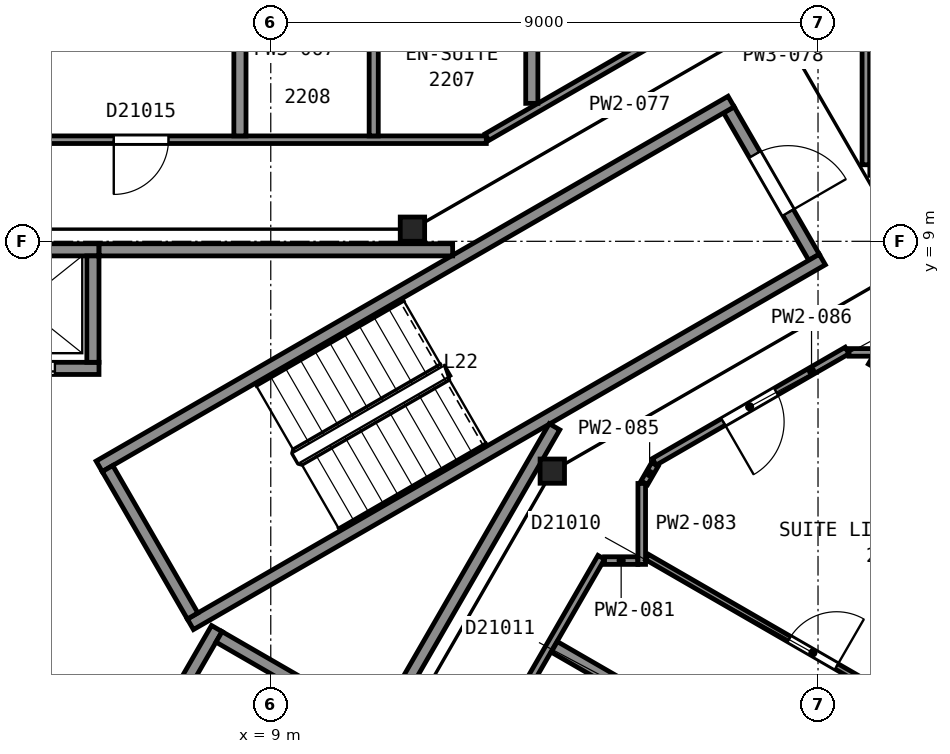
"""IFC4 building model, lengths in metres.
Left out: names, types, materials, properties, quantities, classifications, styles, units other than length and angle.
Written with IfcOpenShell. Run it as: python <this file> out.ifc"""

import sys

from ifc_helpers import new_model, si_unit, direction, frame, frame_2d, origin, origin_2d, place, context, subcontext, project, spatial, rectangle, i_section, extrude, element, fill, save


model = new_model("IFC4")
c1 = context("Model", 3, precision=1e-05, world=origin(), true_north=direction((0.0, 1.0)))
c2 = subcontext(c1, "Body", "Model", "MODEL_VIEW")
j1 = project(units=[si_unit("LENGTHUNIT", "METRE"), si_unit("PLANEANGLEUNIT", "RADIAN")], contexts=[c1])
p1 = place(None, origin())
s1 = spatial("IfcSite", under=j1, at=p1, CompositionType="ELEMENT")
p2 = place(p1, origin())
s2 = spatial("IfcBuilding", under=s1, at=p2, CompositionType="ELEMENT")
p3 = place(p2, frame((0.0, 0.0, 96.4)))
s3 = spatial("IfcBuildingStorey", under=s2, at=p3, CompositionType="ELEMENT", Elevation=96.4)
for number, where, z_axis, x_axis in (
    (1, (13.63, 5.22, 0.0), (0.0, 0.0, 1.0), (1.0, 0.0, 0.0)),
    (2, (11.33, 9.2, 0.0), (0.0, 0.0, 1.0), (1.0, 0.0, 0.0)),
):
    element("IfcColumn", number, at=place(p3, frame(where, z_axis=z_axis, x_axis=x_axis)), inside=s3, PredefinedType="COLUMN", context=c2, shape_type="SweptSolid", body=[
        extrude(i_section(OverallWidth=0.401, OverallDepth=0.399, WebThickness=0.025, FlangeThickness=0.04, FilletRadius=0.015, at=origin_2d()), origin(), (0.0, 0.0, 1.0), 3.6),
    ])
p4 = place(p3, frame((17.934, 8.738, 0.0), z_axis=(0.0, 0.0, 1.0), x_axis=(-0.49998411664, 0.866034573852, 0.0)))
e3 = element("IfcWall", 3, at=p4, inside=s3, PredefinedType="PARTITIONING", context=c2, shape_type="SweptSolid", body=[
    extrude(rectangle(XDim=2.8, YDim=0.2, at=frame_2d((1.4, 0.0))), origin(), (0.0, 0.0, 1.0), 3.35),
])
p5 = place(p4, frame((0.85, 0.0, 0.0)))
e4 = element("IfcOpeningElement", 4, at=p5, cuts=e3, PredefinedType="OPENING", context=c2, shape_type="SweptSolid", body=[
    extrude(rectangle(XDim=1.1, YDim=2.1, at=frame_2d((0.55, 1.05))), frame((0.0, 0.11, 0.0), z_axis=(0.0, -1.0, 0.0), x_axis=(1.0, 0.0, 0.0)), (0.0, 0.0, 1.0), 0.22),
])
for number, where, z_axis, x_axis in (
    (5, (6.178, 5.299, 0.0), (0.0, 0.0, 1.0), (0.866, 0.5, 0.0)),
    (6, (7.678, 2.701, 0.0), (0.0, 0.0, 1.0), (0.866, 0.5, 0.0)),
):
    element("IfcWall", number, at=place(p3, frame(where, z_axis=z_axis, x_axis=x_axis)), inside=s3, PredefinedType="PARTITIONING", context=c2, shape_type="SweptSolid", body=[
        extrude(rectangle(XDim=12.0, YDim=0.2, at=frame_2d((6.0, 0.0))), origin(), (0.0, 0.0, 1.0), 3.35),
    ])
p6 = place(p3, frame((7.715, 2.838, 0.0), z_axis=(0.0, 0.0, 1.0), x_axis=(-0.500049511043, 0.865996816683, 0.0)))
e7 = element("IfcWall", 7, at=p6, inside=s3, PredefinedType="PARTITIONING", context=c2, shape_type="SweptSolid", body=[
    extrude(rectangle(XDim=2.8, YDim=0.2, at=frame_2d((1.4, 0.0))), origin(), (0.0, 0.0, 1.0), 3.35),
])
p7 = place(p3, frame((3.625, 6.91, 0.0), z_axis=(0.0, 0.0, 1.0), x_axis=(1.0, 0.0, 0.0)))
e8 = element("IfcWall", 8, at=p7, inside=s3, PredefinedType="PARTITIONING", context=c2, shape_type="SweptSolid", body=[
    extrude(rectangle(XDim=2.55, YDim=0.2, at=frame_2d((1.275, 0.0))), origin(), (0.0, 0.0, 1.0), 3.6),
])
p8 = place(p7, frame((0.725, 0.0, 0.0)))
e9 = element("IfcOpeningElement", 9, at=p8, cuts=e8, PredefinedType="OPENING", context=c2, shape_type="SweptSolid", body=[
    extrude(rectangle(XDim=1.1, YDim=2.1, at=frame_2d((0.55, 1.05))), frame((0.0, 0.11, 0.0), z_axis=(0.0, -1.0, 0.0), x_axis=(1.0, 0.0, 0.0)), (0.0, 0.0, 1.0), 0.22),
])
p9 = place(p3, frame((3.625, 8.86, 0.0), z_axis=(0.0, 0.0, 1.0), x_axis=(1.0, 0.0, 0.0)))
e10 = element("IfcWall", 10, at=p9, inside=s3, PredefinedType="PARTITIONING", context=c2, shape_type="SweptSolid", body=[
    extrude(rectangle(XDim=2.55, YDim=0.2, at=frame_2d((1.275, 0.0))), origin(), (0.0, 0.0, 1.0), 3.6),
])
p10 = place(p3, frame((5.663, -1.612, 0.0), z_axis=(0.0, 0.0, 1.0), x_axis=(0.49998122708, 0.866036242063, 0.0)))
e11 = element("IfcWall", 11, at=p10, inside=s3, PredefinedType="PARTITIONING", context=c2, shape_type="SweptSolid", body=[
    extrude(rectangle(XDim=4.9, YDim=0.2, at=frame_2d((2.45, 0.0))), origin(), (0.0, 0.0, 1.0), 3.6),
])
p11 = place(p3, frame((6.075, 7.01, 0.0), z_axis=(0.0, 0.0, 1.0), x_axis=(0.0, 1.0, 0.0)))
e12 = element("IfcWall", 12, at=p11, inside=s3, PredefinedType="PARTITIONING", context=c2, shape_type="SweptSolid", body=[
    extrude(rectangle(XDim=1.75, YDim=0.2, at=frame_2d((0.875, 0.0))), origin(), (0.0, 0.0, 1.0), 3.6),
])
p12 = place(p3, frame((9.665, 1.62, 0.0), z_axis=(0.0, 0.0, 1.0), x_axis=(-0.866002029911, 0.500040482552, 0.0)))
e13 = element("IfcWall", 13, at=p12, inside=s3, PredefinedType="PARTITIONING", context=c2, shape_type="SweptSolid", body=[
    extrude(rectangle(XDim=1.75, YDim=0.2, at=frame_2d((0.875, 0.0))), origin(), (0.0, 0.0, 1.0), 3.6),
])
p13 = place(p3, frame((6.177, 8.86, 0.0), z_axis=(0.0, 0.0, 1.0), x_axis=(1.0, 0.0, 0.0)))
e14 = element("IfcWall", 14, at=p13, inside=s3, PredefinedType="PARTITIONING", context=c2, shape_type="SweptSolid", body=[
    extrude(rectangle(XDim=5.814, YDim=0.2, at=frame_2d((2.907, 0.0))), origin(), (0.0, 0.0, 1.0), 3.35),
])
p14 = place(p3, frame((8.492, -3.012, 0.0), z_axis=(0.0, 0.0, 1.0), x_axis=(0.499972957231, 0.866041016371, 0.0)))
e15 = element("IfcWall", 15, at=p14, inside=s3, PredefinedType="PARTITIONING", context=c2, shape_type="SweptSolid", body=[
    extrude(rectangle(XDim=10.349, YDim=0.2, at=frame_2d((5.174, 0.0))), origin(), (0.0, 0.0, 1.0), 3.35),
])
p15 = place(p3, frame((-12.544, 10.671, 0.0), z_axis=(0.0, 0.0, 1.0), x_axis=(1.0, 0.0, 0.0)))
e16 = element("IfcWall", 16, at=p15, inside=s3, PredefinedType="PARTITIONING", context=c2, shape_type="SweptSolid", body=[
    extrude(rectangle(XDim=25.089, YDim=0.125, at=frame_2d((12.544, 0.0))), origin(), (0.0, 0.0, 1.0), 2.613),
])
p16 = place(p15, frame((18.962, 0.0, 0.0)))
e17 = element("IfcOpeningElement", 17, at=p16, cuts=e16, PredefinedType="OPENING", context=c2, shape_type="SweptSolid", body=[
    extrude(rectangle(XDim=0.9, YDim=2.1, at=frame_2d((0.45, 1.05))), frame((0.0, 0.073, 0.0), z_axis=(0.0, -1.0, 0.0), x_axis=(1.0, 0.0, 0.0)), (0.0, 0.0, 1.0), 0.145),
])
p17 = place(p15, frame((14.857, 0.0, 0.0)))
e18 = element("IfcOpeningElement", 18, at=p17, cuts=e16, PredefinedType="OPENING", context=c2, shape_type="SweptSolid", body=[
    extrude(rectangle(XDim=1.0, YDim=2.1, at=frame_2d((0.5, 1.05))), frame((0.0, 0.073, 0.0), z_axis=(0.0, -1.0, 0.0), x_axis=(1.0, 0.0, 0.0)), (0.0, 0.0, 1.0), 0.145),
])
p18 = place(p3, frame((8.493, 10.733, 0.0), z_axis=(0.0, 0.0, 1.0), x_axis=(0.0, 1.0, 0.0)))
e19 = element("IfcWall", 19, at=p18, inside=s3, PredefinedType="PARTITIONING", context=c2, shape_type="SweptSolid", body=[
    extrude(rectangle(XDim=2.838, YDim=0.2, at=frame_2d((1.419, 0.0))), origin(), (0.0, 0.0, 1.0), 2.613),
])
p19 = place(p3, frame((9.41, -4.902, 0.0), z_axis=(0.0, 0.0, 1.0), x_axis=(0.499971244726, 0.866042005013, 0.0)))
e20 = element("IfcWall", 20, at=p19, inside=s3, PredefinedType="PARTITIONING", context=c2, shape_type="SweptSolid", body=[
    extrude(rectangle(XDim=10.052, YDim=0.125, at=frame_2d((5.026, 0.0))), origin(), (0.0, 0.0, 1.0), 2.613),
])
p20 = place(p3, frame((10.693, 10.733, 0.0), z_axis=(0.0, 0.0, 1.0), x_axis=(0.0, 1.0, 0.0)))
e21 = element("IfcWall", 21, at=p20, inside=s3, PredefinedType="PARTITIONING", context=c2, shape_type="SweptSolid", body=[
    extrude(rectangle(XDim=6.982, YDim=0.15, at=frame_2d((3.491, 0.0))), origin(), (0.0, 0.0, 1.0), 2.613),
])
p21 = place(p3, frame((12.556, 10.713, 0.0), z_axis=(0.0, 0.0, 1.0), x_axis=(0.86603035395, 0.499991425964, 0.0)))
e22 = element("IfcWall", 22, at=p21, inside=s3, PredefinedType="PARTITIONING", context=c2, shape_type="SweptSolid", body=[
    extrude(rectangle(XDim=3.824, YDim=0.125, at=frame_2d((1.912, 0.0))), origin(), (0.0, 0.0, 1.0), 2.613),
])
p22 = place(p3, frame((13.293, 11.269, 0.0), z_axis=(0.0, 0.0, 1.0), x_axis=(0.0, 1.0, 0.0)))
e23 = element("IfcWall", 23, at=p22, inside=s3, PredefinedType="PARTITIONING", context=c2, shape_type="SweptSolid", body=[
    extrude(rectangle(XDim=3.665, YDim=0.2, at=frame_2d((1.833, 0.0))), origin(), (0.0, 0.0, 1.0), 2.613),
])
p23 = place(p22, frame((1.32, 0.0, 0.0)))
e24 = element("IfcOpeningElement", 24, at=p23, cuts=e23, PredefinedType="OPENING", context=c2, shape_type="SweptSolid", body=[
    extrude(rectangle(XDim=0.8, YDim=2.1, at=frame_2d((0.4, 1.05))), frame((0.0, 0.11, 0.0), z_axis=(0.0, -1.0, 0.0), x_axis=(1.0, 0.0, 0.0)), (0.0, 0.0, 1.0), 0.22),
])
p24 = place(p3, frame((16.463, 0.714, 0.0), z_axis=(0.0, 0.0, 1.0), x_axis=(-0.86609757561, 0.499874973892, 0.0)))
e25 = element("IfcWall", 25, at=p24, inside=s3, PredefinedType="PARTITIONING", context=c2, shape_type="SweptSolid", body=[
    extrude(rectangle(XDim=3.233, YDim=0.2, at=frame_2d((1.617, 0.0))), origin(), (0.0, 0.0, 1.0), 2.613),
])
p25 = place(p24, frame((1.301, 0.0, 0.0)))
e26 = element("IfcOpeningElement", 26, at=p25, cuts=e25, PredefinedType="OPENING", context=c2, shape_type="SweptSolid", body=[
    extrude(rectangle(XDim=0.8, YDim=2.1, at=frame_2d((0.4, 1.05))), frame((0.0, 0.11, 0.0), z_axis=(0.0, -1.0, 0.0), x_axis=(1.0, 0.0, 0.0)), (0.0, 0.0, 1.0), 0.22),
])
p26 = place(p3, frame((14.489, 3.749, 0.0), z_axis=(0.0, 0.0, 1.0), x_axis=(1.0, 0.0, 0.0)))
e27 = element("IfcWall", 27, at=p26, inside=s3, PredefinedType="PARTITIONING", context=c2, shape_type="SweptSolid", body=[
    extrude(rectangle(XDim=0.547, YDim=0.125, at=frame_2d((0.273, 0.0))), origin(), (0.0, 0.0, 1.0), 2.613),
])
p27 = place(p3, frame((15.101, 3.687, 0.0), z_axis=(0.0, 0.0, 1.0), x_axis=(0.0, 1.0, 0.0)))
e28 = element("IfcWall", 28, at=p27, inside=s3, PredefinedType="PARTITIONING", context=c2, shape_type="SweptSolid", body=[
    extrude(rectangle(XDim=1.331, YDim=0.125, at=frame_2d((0.666, 0.0))), origin(), (0.0, 0.0, 1.0), 2.613),
])
p28 = place(p3, frame((20.787, 0.575, 0.0), z_axis=(0.0, 0.0, 1.0), x_axis=(-0.866012632051, 0.500022120638, 0.0)))
e29 = element("IfcWall", 29, at=p28, inside=s3, PredefinedType="PARTITIONING", context=c2, shape_type="SweptSolid", body=[
    extrude(rectangle(XDim=6.465, YDim=0.1, at=frame_2d((3.232, 0.0))), origin(), (0.0, 0.0, 1.0), 2.613),
])
p29 = place(p28, frame((2.866, 0.0, 0.0)))
e30 = element("IfcOpeningElement", 30, at=p29, cuts=e29, PredefinedType="OPENING", context=c2, shape_type="SweptSolid", body=[
    extrude(rectangle(XDim=0.9, YDim=2.1, at=frame_2d((0.45, 1.05))), frame((0.0, 0.06, 0.0), z_axis=(0.0, -1.0, 0.0), x_axis=(1.0, 0.0, 0.0)), (0.0, 0.0, 1.0), 0.12),
])
p30 = place(p3, frame((15.144, 5.029, 0.0), z_axis=(0.0, 0.0, 1.0), x_axis=(0.499682006278, 0.86620891972, 0.0)))
e31 = element("IfcWall", 31, at=p30, inside=s3, PredefinedType="PARTITIONING", context=c2, shape_type="SweptSolid", body=[
    extrude(rectangle(XDim=0.348, YDim=0.125, at=frame_2d((0.174, 0.0))), origin(), (0.0, 0.0, 1.0), 2.613),
])
p31 = place(p3, frame((18.478, 7.204, 0.0), z_axis=(0.0, 0.0, 1.0), x_axis=(-0.866011320536, -0.500024392108, 0.0)))
e32 = element("IfcWall", 32, at=p31, inside=s3, PredefinedType="PARTITIONING", context=c2, shape_type="SweptSolid", body=[
    extrude(rectangle(XDim=3.663, YDim=0.125, at=frame_2d((1.832, 0.0))), origin(), (0.0, 0.0, 1.0), 2.613),
])
p32 = place(p31, frame((1.351, 0.0, 0.0)))
e33 = element("IfcOpeningElement", 33, at=p32, cuts=e32, PredefinedType="OPENING", context=c2, shape_type="SweptSolid", body=[
    extrude(rectangle(XDim=1.0, YDim=2.1, at=frame_2d((0.5, 1.05))), frame((0.0, 0.073, 0.0), z_axis=(0.0, -1.0, 0.0), x_axis=(1.0, 0.0, 0.0)), (0.0, 0.0, 1.0), 0.145),
])
p33 = place(p3, frame((18.509, 7.173, 0.0), z_axis=(0.0, 0.0, 1.0), x_axis=(1.0, 0.0, 0.0)))
e34 = element("IfcWall", 34, at=p33, inside=s3, PredefinedType="PARTITIONING", context=c2, shape_type="SweptSolid", body=[
    extrude(rectangle(XDim=2.513, YDim=0.125, at=frame_2d((1.256, 0.0))), origin(), (0.0, 0.0, 1.0), 2.613),
])
p34 = place(p3, frame((18.866, 7.046, 0.0), z_axis=(0.0, 0.0, 1.0), x_axis=(0.866042025588, -0.499971209087, 0.0)))
e35 = element("IfcWall", 35, at=p34, inside=s3, PredefinedType="PARTITIONING", context=c2, shape_type="SweptSolid", body=[
    extrude(rectangle(XDim=4.899, YDim=0.15, at=frame_2d((2.45, 0.0))), origin(), (0.0, 0.0, 1.0), 2.613),
])
p35 = place(p3, frame((18.787, 10.259, 0.0), z_axis=(0.0, 0.0, 1.0), x_axis=(0.0, 1.0, 0.0)))
e36 = element("IfcWall", 36, at=p35, inside=s3, PredefinedType="PARTITIONING", context=c2, shape_type="SweptSolid", body=[
    extrude(rectangle(XDim=3.93, YDim=0.125, at=frame_2d((1.965, 0.0))), origin(), (0.0, 0.0, 1.0), 2.613),
])
p36 = place(p5, origin())
e37 = element("IfcDoor", 37, at=p36, inside=s3, OperationType="SINGLE_SWING_LEFT", PredefinedType="DOOR", context=c2, shape_type="SweptSolid", body=[
    extrude(rectangle(XDim=1.1, YDim=2.1, at=frame_2d((0.55, 1.05))), frame((0.0, 0.025, 0.0), z_axis=(0.0, -1.0, 0.0), x_axis=(1.0, 0.0, 0.0)), (0.0, 0.0, 1.0), 0.05),
])
fill(e4, e37)
p37 = place(p8, origin())
e38 = element("IfcDoor", 38, at=p37, inside=s3, OperationType="SLIDING_TO_LEFT", PredefinedType="DOOR", context=c2, shape_type="SweptSolid", body=[
    extrude(rectangle(XDim=1.1, YDim=2.1, at=frame_2d((0.55, 1.05))), frame((0.0, 0.025, 0.0), z_axis=(0.0, -1.0, 0.0), x_axis=(1.0, 0.0, 0.0)), (0.0, 0.0, 1.0), 0.05),
])
fill(e9, e38)
p38 = place(p16, origin())
e39 = element("IfcDoor", 39, at=p38, inside=s3, OperationType="SINGLE_SWING_LEFT", PredefinedType="DOOR", context=c2, shape_type="SweptSolid", body=[
    extrude(rectangle(XDim=0.9, YDim=2.1, at=frame_2d((0.45, 1.05))), frame((0.0, 0.025, 0.0), z_axis=(0.0, -1.0, 0.0), x_axis=(1.0, 0.0, 0.0)), (0.0, 0.0, 1.0), 0.05),
])
fill(e17, e39)
p39 = place(p29, origin())
e40 = element("IfcDoor", 40, at=p39, inside=s3, OperationType="SINGLE_SWING_LEFT", PredefinedType="DOOR", context=c2, shape_type="SweptSolid", body=[
    extrude(rectangle(XDim=0.9, YDim=2.1, at=frame_2d((0.45, 1.05))), frame((0.0, 0.025, 0.0), z_axis=(0.0, -1.0, 0.0), x_axis=(1.0, 0.0, 0.0)), (0.0, 0.0, 1.0), 0.05),
])
fill(e30, e40)
p40 = place(p32, origin())
e41 = element("IfcDoor", 41, at=p40, inside=s3, OperationType="SINGLE_SWING_RIGHT", PredefinedType="DOOR", context=c2, shape_type="SweptSolid", body=[
    extrude(rectangle(XDim=1.0, YDim=2.1, at=frame_2d((0.5, 1.05))), frame((0.0, 0.025, 0.0), z_axis=(0.0, -1.0, 0.0), x_axis=(1.0, 0.0, 0.0)), (0.0, 0.0, 1.0), 0.05),
])
fill(e33, e41)
save(model, sys.argv[1])
